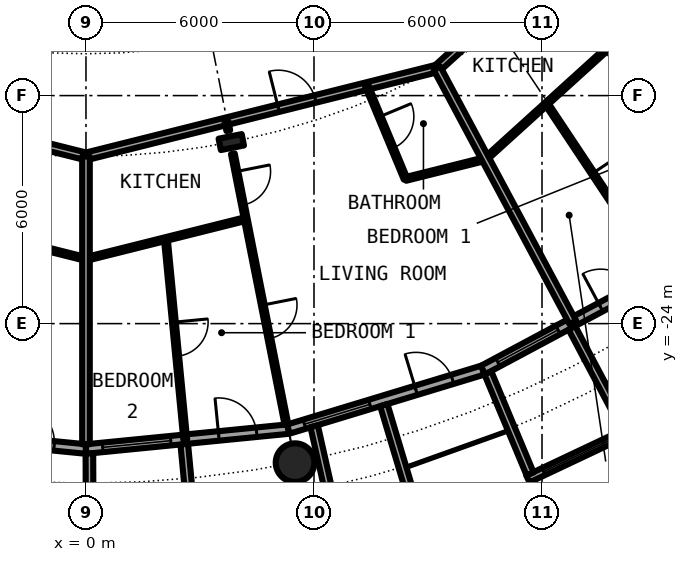
"""IFC4 building model, lengths in metres.
Left out: names, types, materials, properties, quantities, classifications, styles, units other than length and angle.
Written with IfcOpenShell. Run it as: python <this file> out.ifc"""

import sys

from ifc_helpers import new_model, si_unit, direction, frame, frame_2d, origin, origin_2d, place, context, subcontext, project, spatial, rectangle, circle, hollow_circle, i_section, extrude, element, fill, save


model = new_model("IFC4")
c1 = context("Model", 3, precision=1e-05, world=origin(), true_north=direction((0.0, 1.0)))
c2 = subcontext(c1, "Body", "Model", "MODEL_VIEW")
j1 = project(units=[si_unit("LENGTHUNIT", "METRE"), si_unit("PLANEANGLEUNIT", "RADIAN")], contexts=[c1])
p1 = place(None, origin())
s1 = spatial("IfcSite", under=j1, at=p1, CompositionType="ELEMENT")
p2 = place(p1, origin())
s2 = spatial("IfcBuilding", under=s1, at=p2, CompositionType="ELEMENT")
p3 = place(p2, frame((0.0, 0.0, 28.9)))
s3 = spatial("IfcBuildingStorey", under=s2, at=p3, CompositionType="ELEMENT", Elevation=28.9)
p4 = place(p3, frame((5.501, -27.658, 0.0), z_axis=(0.0, 0.0, 1.0), x_axis=(1.0, 0.0, 0.0)))
e1 = element("IfcColumn", 1, at=p4, inside=s3, PredefinedType="COLUMN", context=c2, shape_type="SweptSolid", body=[
    extrude(hollow_circle(Radius=0.508, WallThickness=0.05, at=origin_2d()), origin(), (0.0, 0.0, 1.0), 3.05),
])
p5 = place(p3, frame((3.824, -19.223, 0.0), z_axis=(0.0, 0.0, 1.0), x_axis=(0.195090322016, -0.980785280403, 0.0)))
e2 = element("IfcColumn", 2, at=p5, inside=s3, PredefinedType="COLUMN", context=c2, shape_type="SweptSolid", body=[
    extrude(i_section(OverallWidth=0.305, OverallDepth=0.62, WebThickness=0.021, FlangeThickness=0.04, FilletRadius=0.027, at=origin_2d()), origin(), (0.0, 0.0, 1.0), 3.05),
])
p6 = place(p3, frame((-5.326, -26.775, 0.0), z_axis=(0.0, 0.0, 1.0), x_axis=(0.995173996315, -0.098126026407, 0.0)))
e3 = element("IfcWall", 3, at=p6, inside=s3, PredefinedType="SOLIDWALL", context=c2, shape_type="SweptSolid", body=[
    extrude(rectangle(XDim=5.352, YDim=0.25, at=frame_2d((2.676, 0.0))), origin(), (0.0, 0.0, 1.0), 2.7),
])
p7 = place(p6, frame((0.441, 0.0, 0.3)))
e4 = element("IfcOpeningElement", 4, at=p7, cuts=e3, PredefinedType="OPENING", context=c2, shape_type="SweptSolid", body=[
    extrude(rectangle(XDim=1.8, YDim=2.1, at=frame_2d((0.9, 1.05))), frame((0.0, 0.135, 0.0), z_axis=(0.0, -1.0, 0.0), x_axis=(1.0, 0.0, 0.0)), (0.0, 0.0, 1.0), 0.27),
])
p8 = place(p6, frame((3.51, 0.0, 0.0)))
e5 = element("IfcOpeningElement", 5, at=p8, cuts=e3, PredefinedType="OPENING", context=c2, shape_type="SweptSolid", body=[
    extrude(rectangle(XDim=1.0, YDim=2.2, at=frame_2d((0.5, 1.1))), frame((0.0, 0.135, 0.0), z_axis=(0.0, -1.0, 0.0), x_axis=(1.0, 0.0, 0.0)), (0.0, 0.0, 1.0), 0.27),
])
p9 = place(p3, frame((0.0, -27.3, 0.0), z_axis=(0.0, 0.0, 1.0), x_axis=(0.995173996315, 0.098126026407, 0.0)))
e6 = element("IfcWall", 6, at=p9, inside=s3, PredefinedType="SOLIDWALL", context=c2, shape_type="SweptSolid", body=[
    extrude(rectangle(XDim=5.352, YDim=0.25, at=frame_2d((2.676, 0.0))), origin(), (0.0, 0.0, 1.0), 2.7),
])
p10 = place(p9, frame((0.441, 0.0, 0.3)))
e7 = element("IfcOpeningElement", 7, at=p10, cuts=e6, PredefinedType="OPENING", context=c2, shape_type="SweptSolid", body=[
    extrude(rectangle(XDim=1.8, YDim=2.1, at=frame_2d((0.9, 1.05))), frame((0.0, 0.135, 0.0), z_axis=(0.0, -1.0, 0.0), x_axis=(1.0, 0.0, 0.0)), (0.0, 0.0, 1.0), 0.27),
])
p11 = place(p9, frame((3.51, 0.0, 0.0)))
e8 = element("IfcOpeningElement", 8, at=p11, cuts=e6, PredefinedType="OPENING", context=c2, shape_type="SweptSolid", body=[
    extrude(rectangle(XDim=1.0, YDim=2.2, at=frame_2d((0.5, 1.1))), frame((0.0, 0.135, 0.0), z_axis=(0.0, -1.0, 0.0), x_axis=(1.0, 0.0, 0.0)), (0.0, 0.0, 1.0), 0.27),
])
p12 = place(p3, frame((0.09, -27.417, -0.03), z_axis=(0.0, 0.0, 1.0), x_axis=(0.00347308367, -0.999993968827, 0.0)))
e9 = element("IfcWall", 9, at=p12, inside=s3, PredefinedType="SOLIDWALL", context=c2, shape_type="SweptSolid", body=[
    extrude(rectangle(XDim=2.882, YDim=0.2, at=frame_2d((1.441, 0.0))), origin(), (0.0, 0.0, 1.0), 2.73),
])
p13 = place(p3, frame((2.586, -27.171, -0.03), z_axis=(0.0, 0.0, 1.0), x_axis=(0.094548432284, -0.995520262954, 0.0)))
e10 = element("IfcWall", 10, at=p13, inside=s3, PredefinedType="SOLIDWALL", context=c2, shape_type="SweptSolid", body=[
    extrude(rectangle(XDim=3.006, YDim=0.2, at=frame_2d((1.503, 0.0))), origin(), (0.0, 0.0, 1.0), 2.73),
])
p14 = place(p3, frame((5.326, -26.775, 0.0), z_axis=(0.0, 0.0, 1.0), x_axis=(0.956965678721, 0.290201119486, 0.0)))
e11 = element("IfcWall", 11, at=p14, inside=s3, PredefinedType="SOLIDWALL", context=c2, shape_type="SweptSolid", body=[
    extrude(rectangle(XDim=5.351, YDim=0.25, at=frame_2d((2.676, 0.0))), origin(), (0.0, 0.0, 1.0), 2.7),
])
p15 = place(p14, frame((0.441, 0.0, 0.3)))
e12 = element("IfcOpeningElement", 12, at=p15, cuts=e11, PredefinedType="OPENING", context=c2, shape_type="SweptSolid", body=[
    extrude(rectangle(XDim=1.8, YDim=2.1, at=frame_2d((0.9, 1.05))), frame((0.0, 0.135, 0.0), z_axis=(0.0, -1.0, 0.0), x_axis=(1.0, 0.0, 0.0)), (0.0, 0.0, 1.0), 0.27),
])
p16 = place(p14, frame((3.51, 0.0, 0.0)))
e13 = element("IfcOpeningElement", 13, at=p16, cuts=e11, PredefinedType="OPENING", context=c2, shape_type="SweptSolid", body=[
    extrude(rectangle(XDim=1.0, YDim=2.2, at=frame_2d((0.5, 1.1))), frame((0.0, 0.135, 0.0), z_axis=(0.0, -1.0, 0.0), x_axis=(1.0, 0.0, 0.0)), (0.0, 0.0, 1.0), 0.27),
])
p17 = place(p3, frame((6.004, -26.7, -0.03), z_axis=(0.0, 0.0, 1.0), x_axis=(0.219609259383, -0.975587911566, 0.0)))
e14 = element("IfcWall", 14, at=p17, inside=s3, PredefinedType="SOLIDWALL", context=c2, shape_type="SweptSolid", body=[
    extrude(rectangle(XDim=2.933, YDim=0.2, at=frame_2d((1.466, 0.0))), origin(), (0.0, 0.0, 1.0), 2.73),
])
p18 = place(p3, frame((7.837, -26.144, -0.03), z_axis=(0.0, 0.0, 1.0), x_axis=(0.287064767992, -0.957911174889, 0.0)))
e15 = element("IfcWall", 15, at=p18, inside=s3, PredefinedType="SOLIDWALL", context=c2, shape_type="SweptSolid", body=[
    extrude(rectangle(XDim=3.006, YDim=0.2, at=frame_2d((1.503, 0.0))), origin(), (0.0, 0.0, 1.0), 2.73),
])
p19 = place(p3, frame((10.447, -25.222, 0.0), z_axis=(0.0, 0.0, 1.0), x_axis=(0.881915646801, 0.471407246368, 0.0)))
e16 = element("IfcWall", 16, at=p19, inside=s3, PredefinedType="SOLIDWALL", context=c2, shape_type="SweptSolid", body=[
    extrude(rectangle(XDim=5.352, YDim=0.25, at=frame_2d((2.676, 0.0))), origin(), (0.0, 0.0, 1.0), 2.7),
])
p20 = place(p19, frame((0.441, 0.0, 0.3)))
e17 = element("IfcOpeningElement", 17, at=p20, cuts=e16, PredefinedType="OPENING", context=c2, shape_type="SweptSolid", body=[
    extrude(rectangle(XDim=1.8, YDim=2.1, at=frame_2d((0.9, 1.05))), frame((0.0, 0.135, 0.0), z_axis=(0.0, -1.0, 0.0), x_axis=(1.0, 0.0, 0.0)), (0.0, 0.0, 1.0), 0.27),
])
p21 = place(p19, frame((3.51, 0.0, 0.0)))
e18 = element("IfcOpeningElement", 18, at=p21, cuts=e16, PredefinedType="OPENING", context=c2, shape_type="SweptSolid", body=[
    extrude(rectangle(XDim=1.0, YDim=2.2, at=frame_2d((0.5, 1.1))), frame((0.0, 0.135, 0.0), z_axis=(0.0, -1.0, 0.0), x_axis=(1.0, 0.0, 0.0)), (0.0, 0.0, 1.0), 0.27),
])
p22 = place(p3, frame((11.629, -28.088, -0.03), z_axis=(0.0, 0.0, 1.0), x_axis=(0.904000060331, 0.427532327342, 0.0)))
e19 = element("IfcWall", 19, at=p22, inside=s3, PredefinedType="SOLIDWALL", context=c2, shape_type="SweptSolid", body=[
    extrude(rectangle(XDim=2.993, YDim=0.2, at=frame_2d((1.497, 0.0))), origin(), (0.0, 0.0, 1.0), 2.73),
])
p23 = place(p22, frame((0.457, 0.0, 0.33)))
e20 = element("IfcOpeningElement", 20, at=p23, cuts=e19, PredefinedType="OPENING", context=c2, shape_type="SweptSolid", body=[
    extrude(circle(Radius=1.04, at=frame_2d((1.04, 1.04))), frame((0.0, 0.11, 0.0), z_axis=(0.0, -1.0, 0.0), x_axis=(1.0, 0.0, 0.0)), (0.0, 0.0, 1.0), 0.22),
])
p24 = place(p3, frame((10.575, -25.295, -0.03), z_axis=(0.0, 0.0, 1.0), x_axis=(0.385697364644, -0.922625353492, 0.0)))
e21 = element("IfcWall", 21, at=p24, inside=s3, PredefinedType="SOLIDWALL", context=c2, shape_type="SweptSolid", body=[
    extrude(rectangle(XDim=2.883, YDim=0.2, at=frame_2d((1.442, 0.0))), origin(), (0.0, 0.0, 1.0), 2.73),
])
p25 = place(p3, frame((12.787, -24.113, -0.03), z_axis=(0.0, 0.0, 1.0), x_axis=(0.468365282436, -0.883534924159, 0.0)))
e22 = element("IfcWall", 22, at=p25, inside=s3, PredefinedType="SOLIDWALL", context=c2, shape_type="SweptSolid", body=[
    extrude(rectangle(XDim=3.006, YDim=0.2, at=frame_2d((1.503, 0.0))), origin(), (0.0, 0.0, 1.0), 2.73),
])
p26 = place(p3, frame((-2.096, -21.774, 0.0), z_axis=(0.0, 0.0, 1.0), x_axis=(0.969969957613, -0.24322475476, 0.0)))
e23 = element("IfcWall", 23, at=p26, inside=s3, PredefinedType="PARTITIONING", context=c2, shape_type="SweptSolid", body=[
    extrude(rectangle(XDim=2.167, YDim=0.1, at=frame_2d((1.083, 0.0))), origin(), (0.0, 0.0, 1.0), 2.7),
])
p27 = place(p3, frame((-0.006, -22.301, 0.0), z_axis=(0.0, 0.0, 1.0), x_axis=(0.970106148391, 0.24268098577, 0.0)))
e24 = element("IfcWall", 24, at=p27, inside=s3, PredefinedType="PARTITIONING", context=c2, shape_type="SweptSolid", body=[
    extrude(rectangle(XDim=4.347, YDim=0.1, at=frame_2d((2.173, 0.0))), origin(), (0.0, 0.0, 1.0), 2.7),
])
p28 = place(p3, frame((8.414, -20.193, 0.0), z_axis=(0.0, 0.0, 1.0), x_axis=(0.970076188308, 0.242800718444, 0.0)))
e25 = element("IfcWall", 25, at=p28, inside=s3, PredefinedType="PARTITIONING", context=c2, shape_type="SweptSolid", body=[
    extrude(rectangle(XDim=2.167, YDim=0.1, at=frame_2d((1.083, 0.0))), origin(), (0.0, 0.0, 1.0), 2.7),
])
p29 = place(p3, frame((10.513, -19.668, 0.0), z_axis=(0.0, 0.0, 1.0), x_axis=(0.74092137325, 0.671591779775, 0.0)))
e26 = element("IfcWall", 26, at=p29, inside=s3, PredefinedType="PARTITIONING", context=c2, shape_type="SweptSolid", body=[
    extrude(rectangle(XDim=4.342, YDim=0.1, at=frame_2d((2.171, 0.0))), origin(), (0.0, 0.0, 1.0), 2.7),
])
p30 = place(p3, frame((-9.242, -17.284, 0.0), z_axis=(0.0, 0.0, 1.0), x_axis=(0.970002158938, -0.243096301198, 0.0)))
e27 = element("IfcWall", 27, at=p30, inside=s3, PredefinedType="PARTITIONING", context=c2, shape_type="SweptSolid", body=[
    extrude(rectangle(XDim=9.528, YDim=0.2, at=frame_2d((4.764, 0.0))), origin(), (0.0, 0.0, 1.0), 2.38),
])
p31 = place(p30, frame((4.262, 0.0, 0.0)))
e28 = element("IfcOpeningElement", 28, at=p31, cuts=e27, PredefinedType="OPENING", context=c2, shape_type="SweptSolid", body=[
    extrude(rectangle(XDim=1.0, YDim=2.3, at=frame_2d((0.5, 1.15))), frame((0.0, 0.11, 0.0), z_axis=(0.0, -1.0, 0.0), x_axis=(1.0, 0.0, 0.0)), (0.0, 0.0, 1.0), 0.22),
])
p32 = place(p3, frame((-0.001, -19.601, 0.0), z_axis=(0.0, 0.0, 1.0), x_axis=(0.970014215304, 0.243048188859, 0.0)))
e29 = element("IfcWall", 29, at=p32, inside=s3, PredefinedType="PARTITIONING", context=c2, shape_type="SweptSolid", body=[
    extrude(rectangle(XDim=9.526, YDim=0.2, at=frame_2d((4.763, 0.0))), origin(), (0.0, 0.0, 1.0), 2.38),
])
p33 = place(p32, frame((5.221, 0.0, 0.0)))
e30 = element("IfcOpeningElement", 30, at=p33, cuts=e29, PredefinedType="OPENING", context=c2, shape_type="SweptSolid", body=[
    extrude(rectangle(XDim=1.0, YDim=2.3, at=frame_2d((0.5, 1.15))), frame((0.0, 0.11, 0.0), z_axis=(0.0, -1.0, 0.0), x_axis=(1.0, 0.0, 0.0)), (0.0, 0.0, 1.0), 0.22),
])
p34 = place(p3, frame((9.239, -17.286, 0.0), z_axis=(0.0, 0.0, 1.0), x_axis=(0.74089212117, 0.671624050186, 0.0)))
e31 = element("IfcWall", 31, at=p34, inside=s3, PredefinedType="PARTITIONING", context=c2, shape_type="SweptSolid", body=[
    extrude(rectangle(XDim=9.368, YDim=0.2, at=frame_2d((4.684, 0.0))), origin(), (0.0, 0.0, 1.0), 2.38),
])
p35 = place(p34, frame((5.215, 0.0, 0.0)))
e32 = element("IfcOpeningElement", 32, at=p35, cuts=e31, PredefinedType="OPENING", context=c2, shape_type="SweptSolid", body=[
    extrude(rectangle(XDim=1.0, YDim=2.3, at=frame_2d((0.5, 1.15))), frame((0.0, 0.11, 0.0), z_axis=(0.0, -1.0, 0.0), x_axis=(1.0, 0.0, 0.0)), (0.0, 0.0, 1.0), 0.22),
])
p36 = place(p3, frame((0.0, -27.175, 0.0), z_axis=(0.0, 0.0, 1.0), x_axis=(0.0, 1.0, 0.0)))
e33 = element("IfcWall", 33, at=p36, inside=s3, PredefinedType="PARTITIONING", context=c2, shape_type="SweptSolid", body=[
    extrude(rectangle(XDim=7.575, YDim=0.2, at=frame_2d((3.788, 0.0))), origin(), (0.0, 0.0, 1.0), 2.7),
])
p37 = place(p3, frame((2.102, -21.773, 0.0), z_axis=(0.0, 0.0, 1.0), x_axis=(0.096215269366, -0.995360548716, 0.0)))
e34 = element("IfcWall", 34, at=p37, inside=s3, PredefinedType="PARTITIONING", context=c2, shape_type="SweptSolid", body=[
    extrude(rectangle(XDim=5.301, YDim=0.1, at=frame_2d((2.65, 0.0))), origin(), (0.0, 0.0, 1.0), 2.7),
])
p38 = place(p37, frame((2.2, 0.0, 0.0)))
e35 = element("IfcOpeningElement", 35, at=p38, cuts=e34, PredefinedType="OPENING", context=c2, shape_type="SweptSolid", body=[
    extrude(rectangle(XDim=0.9, YDim=2.3, at=frame_2d((0.45, 1.15))), frame((0.0, 0.06, 0.0), z_axis=(0.0, -1.0, 0.0), x_axis=(1.0, 0.0, 0.0)), (0.0, 0.0, 1.0), 0.12),
])
p39 = place(p3, frame((3.695, -18.674, 0.0), z_axis=(0.0, 0.0, 1.0), x_axis=(0.197040251839, -0.980395399395, 0.0)))
e36 = element("IfcWall", 36, at=p39, inside=s3, PredefinedType="PARTITIONING", context=c2, shape_type="SweptSolid", body=[
    extrude(rectangle(XDim=0.254, YDim=0.1, at=frame_2d((0.127, 0.0))), origin(), (0.0, 0.0, 1.0), 2.7),
])
p40 = place(p3, frame((3.865, -19.531, 0.0), z_axis=(0.0, 0.0, 1.0), x_axis=(0.194196464481, -0.980962656365, 0.0)))
e37 = element("IfcWall", 37, at=p40, inside=s3, PredefinedType="PARTITIONING", context=c2, shape_type="SweptSolid", body=[
    extrude(rectangle(XDim=7.265, YDim=0.1, at=frame_2d((3.633, 0.0))), origin(), (0.0, 0.0, 1.0), 2.7),
])
p41 = place(p40, frame((0.476, 0.0, 0.0)))
e38 = element("IfcOpeningElement", 38, at=p41, cuts=e37, PredefinedType="OPENING", context=c2, shape_type="SweptSolid", body=[
    extrude(rectangle(XDim=0.9, YDim=2.3, at=frame_2d((0.45, 1.15))), frame((0.0, 0.06, 0.0), z_axis=(0.0, -1.0, 0.0), x_axis=(1.0, 0.0, 0.0)), (0.0, 0.0, 1.0), 0.12),
])
p42 = place(p40, frame((4.058, 0.0, 0.0)))
e39 = element("IfcOpeningElement", 39, at=p42, cuts=e37, PredefinedType="OPENING", context=c2, shape_type="SweptSolid", body=[
    extrude(rectangle(XDim=0.9, YDim=2.3, at=frame_2d((0.45, 1.15))), frame((0.0, 0.06, 0.0), z_axis=(0.0, -1.0, 0.0), x_axis=(1.0, 0.0, 0.0)), (0.0, 0.0, 1.0), 0.12),
])
p43 = place(p3, frame((7.392, -17.749, 0.0), z_axis=(0.0, 0.0, 1.0), x_axis=(0.384438589316, -0.923150567917, 0.0)))
e40 = element("IfcWall", 40, at=p43, inside=s3, PredefinedType="PARTITIONING", context=c2, shape_type="SweptSolid", body=[
    extrude(rectangle(XDim=2.647, YDim=0.1, at=frame_2d((1.324, 0.0))), origin(), (0.0, 0.0, 1.0), 2.7),
])
p44 = place(p43, frame((0.874, 0.0, 0.0)))
e41 = element("IfcOpeningElement", 41, at=p44, cuts=e40, PredefinedType="OPENING", context=c2, shape_type="SweptSolid", body=[
    extrude(rectangle(XDim=0.9, YDim=2.3, at=frame_2d((0.45, 1.15))), frame((0.0, 0.06, 0.0), z_axis=(0.0, -1.0, 0.0), x_axis=(1.0, 0.0, 0.0)), (0.0, 0.0, 1.0), 0.12),
])
p45 = place(p3, frame((9.239, -17.286, 0.0), z_axis=(0.0, 0.0, 1.0), x_axis=(0.471439510802, -0.881898399848, 0.0)))
e42 = element("IfcWall", 42, at=p45, inside=s3, PredefinedType="PARTITIONING", context=c2, shape_type="SweptSolid", body=[
    extrude(rectangle(XDim=7.575, YDim=0.2, at=frame_2d((3.787, 0.0))), origin(), (0.0, 0.0, 1.0), 2.7),
])
p46 = place(p3, frame((12.062, -14.727, 0.0), z_axis=(0.0, 0.0, 1.0), x_axis=(0.633664062855, -0.773608334654, 0.0)))
e43 = element("IfcWall", 43, at=p46, inside=s3, PredefinedType="PARTITIONING", context=c2, shape_type="SweptSolid", body=[
    extrude(rectangle(XDim=8.138, YDim=0.1, at=frame_2d((4.069, 0.0))), origin(), (0.0, 0.0, 1.0), 2.7),
])
p47 = place(p46, frame((0.861, 0.0, 0.0)))
e44 = element("IfcOpeningElement", 44, at=p47, cuts=e43, PredefinedType="OPENING", context=c2, shape_type="SweptSolid", body=[
    extrude(rectangle(XDim=0.9, YDim=2.3, at=frame_2d((0.45, 1.15))), frame((0.0, 0.06, 0.0), z_axis=(0.0, -1.0, 0.0), x_axis=(1.0, 0.0, 0.0)), (0.0, 0.0, 1.0), 0.12),
])
p48 = place(p46, frame((4.931, 0.0, 0.0)))
e45 = element("IfcOpeningElement", 45, at=p48, cuts=e43, PredefinedType="OPENING", context=c2, shape_type="SweptSolid", body=[
    extrude(rectangle(XDim=0.9, YDim=2.3, at=frame_2d((0.45, 1.15))), frame((0.0, 0.06, 0.0), z_axis=(0.0, -1.0, 0.0), x_axis=(1.0, 0.0, 0.0)), (0.0, 0.0, 1.0), 0.12),
])
p49 = place(p3, frame((12.118, -18.211, 0.0), z_axis=(0.0, 0.0, 1.0), x_axis=(0.553913391217, -0.832574294, 0.0)))
e46 = element("IfcWall", 46, at=p49, inside=s3, PredefinedType="PARTITIONING", context=c2, shape_type="SweptSolid", body=[
    extrude(rectangle(XDim=5.301, YDim=0.1, at=frame_2d((2.65, 0.0))), origin(), (0.0, 0.0, 1.0), 2.7),
])
p50 = place(p49, frame((2.2, 0.0, 0.0)))
e47 = element("IfcOpeningElement", 47, at=p50, cuts=e46, PredefinedType="OPENING", context=c2, shape_type="SweptSolid", body=[
    extrude(rectangle(XDim=0.9, YDim=2.3, at=frame_2d((0.45, 1.15))), frame((0.0, 0.06, 0.0), z_axis=(0.0, -1.0, 0.0), x_axis=(1.0, 0.0, 0.0)), (0.0, 0.0, 1.0), 0.12),
])
p51 = place(p8, origin())
e48 = element("IfcDoor", 48, at=p51, inside=s3, OperationType="SINGLE_SWING_LEFT", PredefinedType="DOOR", context=c2, shape_type="SweptSolid", body=[
    extrude(rectangle(XDim=1.0, YDim=2.2, at=frame_2d((0.5, 1.1))), frame((0.0, 0.025, 0.0), z_axis=(0.0, -1.0, 0.0), x_axis=(1.0, 0.0, 0.0)), (0.0, 0.0, 1.0), 0.05),
])
fill(e5, e48)
p52 = place(p10, origin())
e49 = element("IfcWindow", 49, at=p52, inside=s3, PartitioningType="SINGLE_PANEL", PredefinedType="WINDOW", context=c2, shape_type="SweptSolid", body=[
    extrude(rectangle(XDim=1.8, YDim=2.1, at=frame_2d((0.9, 1.05))), frame((0.0, 0.03, 0.0), z_axis=(0.0, -1.0, 0.0), x_axis=(1.0, 0.0, 0.0)), (0.0, 0.0, 1.0), 0.06),
])
fill(e7, e49)
p53 = place(p11, origin())
e50 = element("IfcDoor", 50, at=p53, inside=s3, OperationType="SINGLE_SWING_LEFT", PredefinedType="DOOR", context=c2, shape_type="SweptSolid", body=[
    extrude(rectangle(XDim=1.0, YDim=2.2, at=frame_2d((0.5, 1.1))), frame((0.0, 0.025, 0.0), z_axis=(0.0, -1.0, 0.0), x_axis=(1.0, 0.0, 0.0)), (0.0, 0.0, 1.0), 0.05),
])
fill(e8, e50)
p54 = place(p15, origin())
e51 = element("IfcWindow", 51, at=p54, inside=s3, PartitioningType="SINGLE_PANEL", PredefinedType="WINDOW", context=c2, shape_type="SweptSolid", body=[
    extrude(rectangle(XDim=1.8, YDim=2.1, at=frame_2d((0.9, 1.05))), frame((0.0, 0.03, 0.0), z_axis=(0.0, -1.0, 0.0), x_axis=(1.0, 0.0, 0.0)), (0.0, 0.0, 1.0), 0.06),
])
fill(e12, e51)
p55 = place(p16, origin())
e52 = element("IfcDoor", 52, at=p55, inside=s3, OperationType="SINGLE_SWING_LEFT", PredefinedType="DOOR", context=c2, shape_type="SweptSolid", body=[
    extrude(rectangle(XDim=1.0, YDim=2.2, at=frame_2d((0.5, 1.1))), frame((0.0, 0.025, 0.0), z_axis=(0.0, -1.0, 0.0), x_axis=(1.0, 0.0, 0.0)), (0.0, 0.0, 1.0), 0.05),
])
fill(e13, e52)
p56 = place(p20, origin())
e53 = element("IfcWindow", 53, at=p56, inside=s3, PartitioningType="SINGLE_PANEL", PredefinedType="WINDOW", context=c2, shape_type="SweptSolid", body=[
    extrude(rectangle(XDim=1.8, YDim=2.1, at=frame_2d((0.9, 1.05))), frame((0.0, 0.03, 0.0), z_axis=(0.0, -1.0, 0.0), x_axis=(1.0, 0.0, 0.0)), (0.0, 0.0, 1.0), 0.06),
])
fill(e17, e53)
p57 = place(p23, origin())
e54 = element("IfcWindow", 54, at=p57, inside=s3, PartitioningType="SINGLE_PANEL", PredefinedType="WINDOW", context=c2, shape_type="SweptSolid", body=[
    extrude(circle(Radius=1.04, at=frame_2d((1.04, 1.04))), frame((0.0, 0.03, 0.0), z_axis=(0.0, -1.0, 0.0), x_axis=(1.0, 0.0, 0.0)), (0.0, 0.0, 1.0), 0.06),
])
fill(e20, e54)
p58 = place(p21, origin())
e55 = element("IfcDoor", 55, at=p58, inside=s3, OperationType="SINGLE_SWING_LEFT", PredefinedType="DOOR", context=c2, shape_type="SweptSolid", body=[
    extrude(rectangle(XDim=1.0, YDim=2.2, at=frame_2d((0.5, 1.1))), frame((0.0, 0.025, 0.0), z_axis=(0.0, -1.0, 0.0), x_axis=(1.0, 0.0, 0.0)), (0.0, 0.0, 1.0), 0.05),
])
fill(e18, e55)
p59 = place(p33, origin())
e56 = element("IfcDoor", 56, at=p59, inside=s3, OperationType="SINGLE_SWING_RIGHT", PredefinedType="DOOR", context=c2, shape_type="SweptSolid", body=[
    extrude(rectangle(XDim=1.0, YDim=2.3, at=frame_2d((0.5, 1.15))), frame((0.0, 0.025, 0.0), z_axis=(0.0, -1.0, 0.0), x_axis=(1.0, 0.0, 0.0)), (0.0, 0.0, 1.0), 0.05),
])
fill(e30, e56)
p60 = place(p44, origin())
e57 = element("IfcDoor", 57, at=p60, inside=s3, OperationType="SINGLE_SWING_RIGHT", PredefinedType="DOOR", context=c2, shape_type="SweptSolid", body=[
    extrude(rectangle(XDim=0.9, YDim=2.3, at=frame_2d((0.45, 1.15))), frame((0.0, 0.025, 0.0), z_axis=(0.0, -1.0, 0.0), x_axis=(1.0, 0.0, 0.0)), (0.0, 0.0, 1.0), 0.05),
])
fill(e41, e57)
p61 = place(p41, origin())
e58 = element("IfcDoor", 58, at=p61, inside=s3, OperationType="SINGLE_SWING_LEFT", PredefinedType="DOOR", context=c2, shape_type="SweptSolid", body=[
    extrude(rectangle(XDim=0.9, YDim=2.3, at=frame_2d((0.45, 1.15))), frame((0.0, 0.025, 0.0), z_axis=(0.0, -1.0, 0.0), x_axis=(1.0, 0.0, 0.0)), (0.0, 0.0, 1.0), 0.05),
])
fill(e38, e58)
p62 = place(p42, origin())
e59 = element("IfcDoor", 59, at=p62, inside=s3, OperationType="SINGLE_SWING_RIGHT", PredefinedType="DOOR", context=c2, shape_type="SweptSolid", body=[
    extrude(rectangle(XDim=0.9, YDim=2.3, at=frame_2d((0.45, 1.15))), frame((0.0, 0.025, 0.0), z_axis=(0.0, -1.0, 0.0), x_axis=(1.0, 0.0, 0.0)), (0.0, 0.0, 1.0), 0.05),
])
fill(e39, e59)
p63 = place(p38, origin())
e60 = element("IfcDoor", 60, at=p63, inside=s3, OperationType="SINGLE_SWING_RIGHT", PredefinedType="DOOR", context=c2, shape_type="SweptSolid", body=[
    extrude(rectangle(XDim=0.9, YDim=2.3, at=frame_2d((0.45, 1.15))), frame((0.0, 0.025, 0.0), z_axis=(0.0, -1.0, 0.0), x_axis=(1.0, 0.0, 0.0)), (0.0, 0.0, 1.0), 0.05),
])
fill(e35, e60)
p64 = place(p50, origin())
e61 = element("IfcDoor", 61, at=p64, inside=s3, OperationType="SINGLE_SWING_RIGHT", PredefinedType="DOOR", context=c2, shape_type="SweptSolid", body=[
    extrude(rectangle(XDim=0.9, YDim=2.3, at=frame_2d((0.45, 1.15))), frame((0.0, 0.025, 0.0), z_axis=(0.0, -1.0, 0.0), x_axis=(1.0, 0.0, 0.0)), (0.0, 0.0, 1.0), 0.05),
])
fill(e47, e61)
save(model, sys.argv[1])
